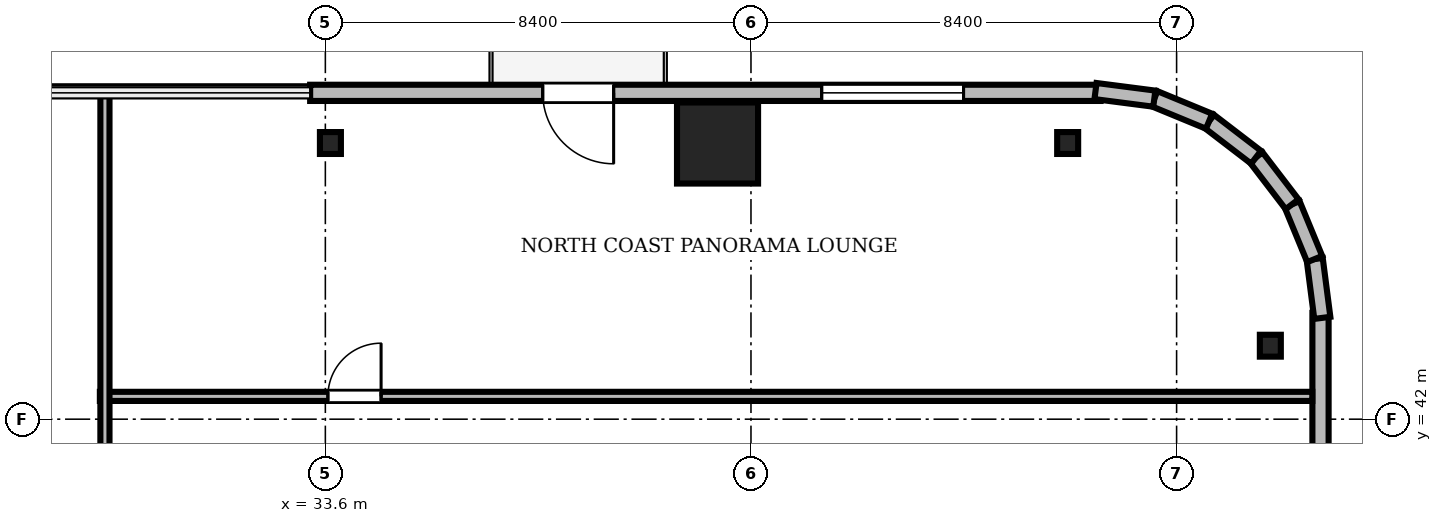
"""IFC4 building model, lengths in metres.
Left out: names, types, materials, properties, quantities, classifications, styles, units other than length and angle.
Written with IfcOpenShell. Run it as: python <this file> out.ifc"""

import sys

from ifc_helpers import new_model, si_unit, direction, frame, frame_2d, origin, origin_2d, place, context, subcontext, project, spatial, rectangle, i_section, extrude, source, transform, mapped, element, fill, save


model = new_model("IFC4")
c1 = context("Model", 3, precision=1e-05, world=origin(), true_north=direction((0.0, 1.0)))
c2 = subcontext(c1, "Body", "Model", "MODEL_VIEW")
j1 = project(units=[si_unit("LENGTHUNIT", "METRE"), si_unit("PLANEANGLEUNIT", "RADIAN")], contexts=[c1])
p1 = place(None, origin())
s1 = spatial("IfcSite", under=j1, at=p1, CompositionType="ELEMENT")
p2 = place(p1, origin())
s2 = spatial("IfcBuilding", under=s1, at=p2, CompositionType="ELEMENT")
p3 = place(p2, frame((0.0, 0.0, 140.9)))
s3 = spatial("IfcBuildingStorey", under=s2, at=p3, CompositionType="ELEMENT", Elevation=140.9)
m1 = source(origin(), c2, "Body", "SweptSolid", [
    extrude(rectangle(XDim=1.6, YDim=1.6, at=origin_2d()), origin(), (0.0, 0.0, 1.0), 3.46),
])
p4 = place(p3, frame((41.34, 47.45, 0.0), z_axis=(0.0, 0.0, 1.0), x_axis=(1.0, 0.0, 0.0)))
e1 = element("IfcColumn", 1, at=p4, inside=s3, PredefinedType="COLUMN", context=c2, shape_type="MappedRepresentation", body=[
    mapped(m1, transform((0.0, 0.0, 0.0), scale=1.0)),
])
m2 = source(origin(), c2, "Body", "SweptSolid", [
    extrude(i_section(OverallWidth=0.414, OverallDepth=0.432, WebThickness=0.026, FlangeThickness=0.04, FilletRadius=0.015, at=origin_2d()), origin(), (0.0, 0.0, 1.0), 3.46),
])
for number, where, z_axis, x_axis in (
    (2, (52.25, 43.45, 0.0), (0.0, 0.0, 1.0), (1.0, 0.0, 0.0)),
    (3, (48.25, 47.45, 0.0), (0.0, 0.0, 1.0), (1.0, 0.0, 0.0)),
    (4, (33.7, 47.45, 0.0), (0.0, 0.0, 1.0), (1.0, 0.0, 0.0)),
):
    element("IfcColumn", number, at=place(p3, frame(where, z_axis=z_axis, x_axis=x_axis)), inside=s3, PredefinedType="COLUMN", context=c2, shape_type="MappedRepresentation", body=[
        mapped(m2, transform((0.0, 0.0, 0.0), scale=1.0)),
    ])
m3 = source(origin(), c2, "Body", "SweptSolid", [
    extrude(rectangle(XDim=15.6, YDim=0.32, at=frame_2d((7.8, 0.0))), origin(), (0.0, 0.0, 1.0), 3.46),
])
p5 = place(p3, frame((48.9, 48.44, 0.0), z_axis=(0.0, 0.0, 1.0), x_axis=(-1.0, 0.0, 0.0)))
e5 = element("IfcWall", 5, at=p5, inside=s3, PredefinedType="SOLIDWALL", context=c2, shape_type="MappedRepresentation", body=[
    mapped(m3, transform((0.0, 0.0, 0.0), scale=1.0)),
])
m4 = source(origin(), c2, "Body", "SweptSolid", [
    extrude(rectangle(XDim=1.4, YDim=2.3, at=frame_2d((0.7, 1.15))), frame((0.0, 0.17, 0.0), z_axis=(0.0, -1.0, 0.0), x_axis=(1.0, 0.0, 0.0)), (0.0, 0.0, 1.0), 0.34),
])
p6 = place(p5, frame((9.61, 0.0, 0.0)))
e6 = element("IfcOpeningElement", 6, at=p6, cuts=e5, PredefinedType="OPENING", context=c2, shape_type="MappedRepresentation", body=[
    mapped(m4, transform((0.0, 0.0, 0.0), scale=1.0)),
])
m5 = source(origin(), c2, "Body", "SweptSolid", [
    extrude(rectangle(XDim=2.8, YDim=2.4, at=frame_2d((1.4, 1.2))), frame((0.0, 0.17, 0.0), z_axis=(0.0, -1.0, 0.0), x_axis=(1.0, 0.0, 0.0)), (0.0, 0.0, 1.0), 0.34),
])
p7 = place(p5, frame((2.705, 0.0, 0.72)))
e7 = element("IfcOpeningElement", 7, at=p7, cuts=e5, PredefinedType="OPENING", context=c2, shape_type="MappedRepresentation", body=[
    mapped(m5, transform((0.0, 0.0, 0.0), scale=1.0)),
])
m6 = source(origin(), c2, "Body", "SweptSolid", [
    extrude(rectangle(XDim=15.6, YDim=0.32, at=frame_2d((7.8, 0.0))), origin(), (0.0, 0.0, 1.0), 3.46),
])
p8 = place(p3, frame((53.24, 28.5, 0.0), z_axis=(0.0, 0.0, 1.0), x_axis=(0.0, 1.0, 0.0)))
e8 = element("IfcWall", 8, at=p8, inside=s3, PredefinedType="SOLIDWALL", context=c2, shape_type="MappedRepresentation", body=[
    mapped(m6, transform((0.0, 0.0, 0.0), scale=1.0)),
])
p9 = place(p8, frame((10.095, 0.0, 0.72)))
e9 = element("IfcOpeningElement", 9, at=p9, cuts=e8, PredefinedType="OPENING", context=c2, shape_type="MappedRepresentation", body=[
    mapped(m5, transform((0.0, 0.0, 0.0), scale=1.0)),
])
m7 = source(origin(), c2, "Body", "SweptSolid", [
    extrude(rectangle(XDim=1.17, YDim=0.32, at=frame_2d((0.585, 0.0))), origin(), (0.0, 0.0, 1.0), 3.46),
])
p10 = place(p3, frame((53.276, 44.0, 0.0), z_axis=(0.0, 0.0, 1.0), x_axis=(-0.128295670475, 0.991735963317, 0.0)))
e10 = element("IfcWall", 10, at=p10, inside=s3, PredefinedType="SOLIDWALL", context=c2, shape_type="MappedRepresentation", body=[
    mapped(m7, transform((0.0, 0.0, 0.0), scale=1.0)),
])
m8 = source(origin(), c2, "Body", "SweptSolid", [
    extrude(rectangle(XDim=1.169, YDim=0.32, at=frame_2d((0.584, 0.0))), origin(), (0.0, 0.0, 1.0), 3.46),
])
p11 = place(p3, frame((53.125, 45.16, 0.0), z_axis=(0.0, 0.0, 1.0), x_axis=(-0.381054331552, 0.924552646638, 0.0)))
e11 = element("IfcWall", 11, at=p11, inside=s3, PredefinedType="SOLIDWALL", context=c2, shape_type="MappedRepresentation", body=[
    mapped(m8, transform((0.0, 0.0, 0.0), scale=1.0)),
])
m9 = source(origin(), c2, "Body", "SweptSolid", [
    extrude(rectangle(XDim=1.169, YDim=0.32, at=frame_2d((0.584, 0.0))), origin(), (0.0, 0.0, 1.0), 3.46),
])
p12 = place(p3, frame((52.68, 46.241, 0.0), z_axis=(0.0, 0.0, 1.0), x_axis=(-0.608387696831, 0.793639975269, 0.0)))
e12 = element("IfcWall", 12, at=p12, inside=s3, PredefinedType="SOLIDWALL", context=c2, shape_type="MappedRepresentation", body=[
    mapped(m9, transform((0.0, 0.0, 0.0), scale=1.0)),
])
m10 = source(origin(), c2, "Body", "SweptSolid", [
    extrude(rectangle(XDim=1.169, YDim=0.32, at=frame_2d((0.584, 0.0))), origin(), (0.0, 0.0, 1.0), 3.46),
])
p13 = place(p3, frame((51.969, 47.169, 0.0), z_axis=(0.0, 0.0, 1.0), x_axis=(-0.793663520347, 0.608356981114, 0.0)))
e13 = element("IfcWall", 13, at=p13, inside=s3, PredefinedType="SOLIDWALL", context=c2, shape_type="MappedRepresentation", body=[
    mapped(m10, transform((0.0, 0.0, 0.0), scale=1.0)),
])
p14 = place(p3, frame((51.041, 47.88, 0.0), z_axis=(0.0, 0.0, 1.0), x_axis=(-0.924552646638, 0.381054331552, 0.0)))
e14 = element("IfcWall", 14, at=p14, inside=s3, PredefinedType="SOLIDWALL", context=c2, shape_type="MappedRepresentation", body=[
    mapped(m8, transform((0.0, 0.0, 0.0), scale=1.0)),
])
p15 = place(p3, frame((49.96, 48.325, 0.0), z_axis=(0.0, 0.0, 1.0), x_axis=(-0.991735963317, 0.128295670475, 0.0)))
e15 = element("IfcWall", 15, at=p15, inside=s3, PredefinedType="SOLIDWALL", context=c2, shape_type="MappedRepresentation", body=[
    mapped(m7, transform((0.0, 0.0, 0.0), scale=1.0)),
])
m11 = source(origin(), c2, "Body", "SweptSolid", [
    extrude(rectangle(XDim=23.928, YDim=0.18, at=frame_2d((11.964, 0.0))), origin(), (0.0, 0.0, 1.0), 2.702),
])
p16 = place(p3, frame((29.15, 42.45, 0.0), z_axis=(0.0, 0.0, 1.0), x_axis=(1.0, 0.0, 0.0)))
e16 = element("IfcWall", 16, at=p16, inside=s3, PredefinedType="PARTITIONING", context=c2, shape_type="MappedRepresentation", body=[
    mapped(m11, transform((0.0, 0.0, 0.0), scale=1.0)),
])
m12 = source(origin(), c2, "Body", "SweptSolid", [
    extrude(rectangle(XDim=1.05, YDim=2.2, at=frame_2d((0.525, 1.1))), frame((0.0, 0.1, 0.0), z_axis=(0.0, -1.0, 0.0), x_axis=(1.0, 0.0, 0.0)), (0.0, 0.0, 1.0), 0.2),
])
p17 = place(p16, frame((4.5, 0.0, 0.0)))
e17 = element("IfcOpeningElement", 17, at=p17, cuts=e16, PredefinedType="OPENING", context=c2, shape_type="MappedRepresentation", body=[
    mapped(m12, transform((0.0, 0.0, 0.0), scale=1.0)),
])
m13 = source(origin(), c2, "Body", "SweptSolid", [
    extrude(rectangle(XDim=11.45, YDim=0.18, at=frame_2d((5.725, 0.0))), origin(), (0.0, 0.0, 1.0), 2.702),
])
p18 = place(p3, frame((29.25, 37.02, 0.0), z_axis=(0.0, 0.0, 1.0), x_axis=(0.0, 1.0, 0.0)))
e18 = element("IfcWall", 18, at=p18, inside=s3, PredefinedType="PARTITIONING", context=c2, shape_type="MappedRepresentation", body=[
    mapped(m13, transform((0.0, 0.0, 0.0), scale=1.0)),
])
m14 = source(origin(), c2, "Body", "SweptSolid", [
    extrude(rectangle(XDim=1.4, YDim=2.3, at=frame_2d((0.7, 1.15))), frame((0.0, 0.025, 0.0), z_axis=(0.0, -1.0, 0.0), x_axis=(1.0, 0.0, 0.0)), (0.0, 0.0, 1.0), 0.05),
])
p19 = place(p6, frame((1.4, 0.0, 0.0), z_axis=(0.0, 0.0, 1.0), x_axis=(-1.0, 0.0, 0.0)))
e19 = element("IfcDoor", 19, at=p19, inside=s3, OperationType="DOUBLE_DOOR_SLIDING", PredefinedType="DOOR", context=c2, shape_type="MappedRepresentation", body=[
    mapped(m14, transform((0.0, 0.0, 0.0), scale=1.0)),
])
fill(e6, e19)
m15 = source(origin(), c2, "Body", "SweptSolid", [
    extrude(rectangle(XDim=2.8, YDim=2.4, at=frame_2d((1.4, 1.2))), frame((0.0, 0.03, 0.0), z_axis=(0.0, -1.0, 0.0), x_axis=(1.0, 0.0, 0.0)), (0.0, 0.0, 1.0), 0.06),
])
p20 = place(p7, origin())
e20 = element("IfcWindow", 20, at=p20, inside=s3, PartitioningType="SINGLE_PANEL", PredefinedType="WINDOW", context=c2, shape_type="MappedRepresentation", body=[
    mapped(m15, transform((0.0, 0.0, 0.0), scale=1.0)),
])
fill(e7, e20)
m16 = source(origin(), c2, "Body", "SweptSolid", [
    extrude(rectangle(XDim=1.05, YDim=2.2, at=frame_2d((0.525, 1.1))), frame((0.0, 0.025, 0.0), z_axis=(0.0, -1.0, 0.0), x_axis=(1.0, 0.0, 0.0)), (0.0, 0.0, 1.0), 0.05),
])
p21 = place(p17, origin())
e21 = element("IfcDoor", 21, at=p21, inside=s3, OperationType="SINGLE_SWING_RIGHT", PredefinedType="DOOR", context=c2, shape_type="MappedRepresentation", body=[
    mapped(m16, transform((0.0, 0.0, 0.0), scale=1.0)),
])
fill(e17, e21)
save(model, sys.argv[1])
